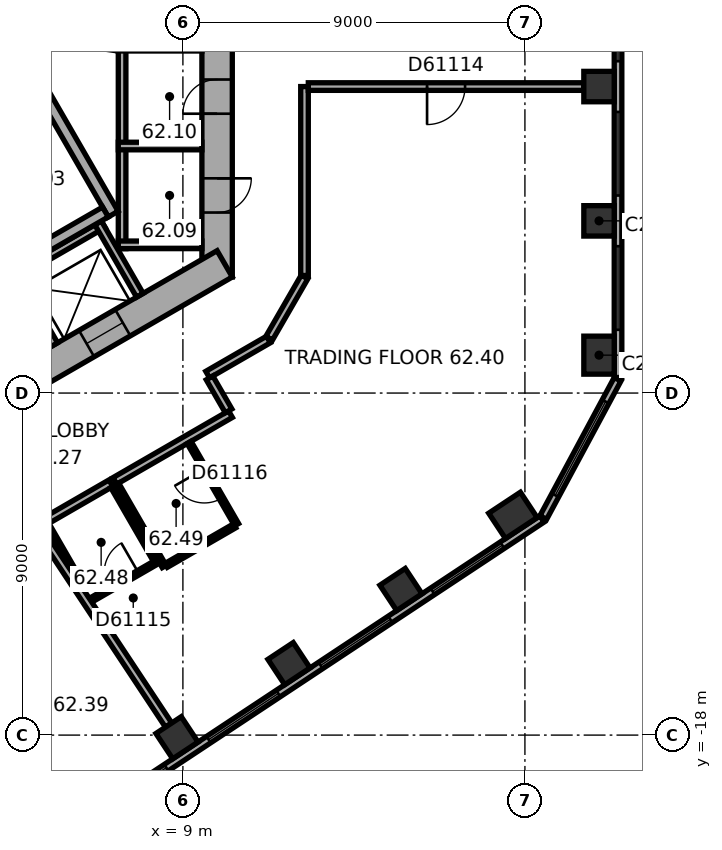
"""IFC4 building model, lengths in metres.
Left out: names, types, materials, properties, quantities, classifications, styles, units other than length and angle.
Written with IfcOpenShell. Run it as: python <this file> out.ifc"""

import sys

from ifc_helpers import new_model, si_unit, direction, frame, frame_2d, origin, origin_2d, place, context, subcontext, project, spatial, rectangle, extrude, element, fill, save


model = new_model("IFC4")
c1 = context("Model", 3, precision=1e-05, world=origin(), true_north=direction((0.0, 1.0)))
c2 = subcontext(c1, "Body", "Model", "MODEL_VIEW")
j1 = project(units=[si_unit("LENGTHUNIT", "METRE"), si_unit("PLANEANGLEUNIT", "RADIAN")], contexts=[c1])
p1 = place(None, origin())
s1 = spatial("IfcSite", under=j1, at=p1, CompositionType="ELEMENT")
p2 = place(p1, origin())
s2 = spatial("IfcBuilding", under=s1, at=p2, CompositionType="ELEMENT")
p3 = place(p2, frame((0.0, 0.0, 251.3)))
s3 = spatial("IfcBuildingStorey", under=s2, at=p3, CompositionType="ELEMENT", Elevation=251.3)
p4 = place(p3, frame((19.95, -8.003, 0.0), z_axis=(0.0, 0.0, 1.0), x_axis=(0.0, 1.0, 0.0)))
e1 = element("IfcColumn", 1, at=p4, inside=s3, PredefinedType="COLUMN", context=c2, shape_type="SweptSolid", body=[
    extrude(rectangle(XDim=1.0, YDim=0.8, at=origin_2d()), origin(), (0.0, 0.0, 1.0), 3.7),
])
for number, where, z_axis, x_axis in (
    (2, (19.95, -4.469, 0.0), (0.0, 0.0, 1.0), (0.0, 1.0, 0.0)),
    (3, (19.95, -0.936, 0.0), (0.0, 0.0, 1.0), (0.0, 1.0, 0.0)),
    (4, (8.844, -18.07, 0.0), (0.0, 0.0, 1.0), (0.834, 0.552, 0.0)),
    (5, (11.791, -16.12, 0.0), (0.0, 0.0, 1.0), (0.834, 0.552, 0.0)),
    (6, (14.738, -14.169, 0.0), (0.0, 0.0, 1.0), (0.834, 0.552, 0.0)),
):
    element("IfcColumn", number, at=place(p3, frame(where, z_axis=z_axis, x_axis=x_axis)), inside=s3, PredefinedType="COLUMN", context=c2, shape_type="SweptSolid", body=[
        extrude(rectangle(XDim=0.8, YDim=0.8, at=origin_2d()), origin(), (0.0, 0.0, 1.0), 3.7),
    ])
p5 = place(p3, frame((17.685, -12.219, 0.0), z_axis=(0.0, 0.0, 1.0), x_axis=(0.833885822067, 0.551936985312, 0.0)))
e7 = element("IfcColumn", 7, at=p5, inside=s3, PredefinedType="COLUMN", context=c2, shape_type="SweptSolid", body=[
    extrude(rectangle(XDim=1.0, YDim=0.8, at=origin_2d()), origin(), (0.0, 0.0, 1.0), 3.7),
])
p6 = place(p3, frame((9.9, -5.947, 0.0), z_axis=(0.0, 0.0, 1.0), x_axis=(0.0, 1.0, 0.0)))
e8 = element("IfcWall", 8, at=p6, inside=s3, PredefinedType="SHEAR", context=c2, shape_type="SweptSolid", body=[
    extrude(rectangle(XDim=11.894, YDim=0.8, at=frame_2d((5.947, 0.0))), origin(), (0.0, 0.0, 1.0), 3.7),
])
p7 = place(p6, frame((6.147, 0.0, 0.0)))
e9 = element("IfcOpeningElement", 9, at=p7, cuts=e8, PredefinedType="OPENING", context=c2, shape_type="SweptSolid", body=[
    extrude(rectangle(XDim=1.5, YDim=2.1, at=frame_2d((0.75, 1.05))), frame((0.0, 0.41, 0.0), z_axis=(0.0, -1.0, 0.0), x_axis=(1.0, 0.0, 0.0)), (0.0, 0.0, 1.0), 0.82),
])
p8 = place(p6, frame((1.697, 0.0, 0.0)))
e10 = element("IfcOpeningElement", 10, at=p8, cuts=e8, PredefinedType="OPENING", context=c2, shape_type="SweptSolid", body=[
    extrude(rectangle(XDim=0.9, YDim=2.1, at=frame_2d((0.45, 1.05))), frame((0.0, 0.41, 0.0), z_axis=(0.0, -1.0, 0.0), x_axis=(1.0, 0.0, 0.0)), (0.0, 0.0, 1.0), 0.82),
])
p9 = place(p6, frame((4.297, 0.0, 0.0)))
e11 = element("IfcOpeningElement", 11, at=p9, cuts=e8, PredefinedType="OPENING", context=c2, shape_type="SweptSolid", body=[
    extrude(rectangle(XDim=0.9, YDim=2.1, at=frame_2d((0.45, 1.05))), frame((0.0, 0.41, 0.0), z_axis=(0.0, -1.0, 0.0), x_axis=(1.0, 0.0, 0.0)), (0.0, 0.0, 1.0), 0.82),
])
p10 = place(p3, frame((-0.2, -11.547, 0.0), z_axis=(0.0, 0.0, 1.0), x_axis=(0.866023897231, 0.500002609418, 0.0)))
e12 = element("IfcWall", 12, at=p10, inside=s3, PredefinedType="SHEAR", context=c2, shape_type="SweptSolid", body=[
    extrude(rectangle(XDim=11.894, YDim=0.8, at=frame_2d((5.947, 0.0))), origin(), (0.0, 0.0, 1.0), 3.7),
])
p11 = place(p10, frame((2.497, 0.0, 0.0)))
e13 = element("IfcOpeningElement", 13, at=p11, cuts=e12, PredefinedType="OPENING", context=c2, shape_type="SweptSolid", body=[
    extrude(rectangle(XDim=1.1, YDim=2.1, at=frame_2d((0.55, 1.05))), frame((0.0, 0.41, 0.0), z_axis=(0.0, -1.0, 0.0), x_axis=(1.0, 0.0, 0.0)), (0.0, 0.0, 1.0), 0.82),
])
p12 = place(p10, frame((5.097, 0.0, 0.0)))
e14 = element("IfcOpeningElement", 14, at=p12, cuts=e12, PredefinedType="OPENING", context=c2, shape_type="SweptSolid", body=[
    extrude(rectangle(XDim=1.1, YDim=2.1, at=frame_2d((0.55, 1.05))), frame((0.0, 0.41, 0.0), z_axis=(0.0, -1.0, 0.0), x_axis=(1.0, 0.0, 0.0)), (0.0, 0.0, 1.0), 0.82),
])
p13 = place(p10, frame((7.697, 0.0, 0.0)))
e15 = element("IfcOpeningElement", 15, at=p13, cuts=e12, PredefinedType="OPENING", context=c2, shape_type="SweptSolid", body=[
    extrude(rectangle(XDim=1.1, YDim=2.1, at=frame_2d((0.55, 1.05))), frame((0.0, 0.41, 0.0), z_axis=(0.0, -1.0, 0.0), x_axis=(1.0, 0.0, 0.0)), (0.0, 0.0, 1.0), 0.82),
])
p14 = place(p3, frame((20.45, -8.59, 0.0), z_axis=(0.0, 0.0, 1.0), x_axis=(0.0, 1.0, 0.0)))
e16 = element("IfcWall", 16, at=p14, inside=s3, PredefinedType="STANDARD", context=c2, shape_type="SweptSolid", body=[
    extrude(rectangle(XDim=18.841, YDim=0.2, at=frame_2d((9.421, 0.0))), origin(), (0.0, 0.0, 1.0), 3.7),
])
p15 = place(p14, frame((1.254, 0.0, 0.9)))
e17 = element("IfcOpeningElement", 17, at=p15, cuts=e16, PredefinedType="OPENING", context=c2, shape_type="SweptSolid", body=[
    extrude(rectangle(XDim=2.2, YDim=2.0, at=frame_2d((1.1, 1.0))), frame((0.0, 0.11, 0.0), z_axis=(0.0, -1.0, 0.0), x_axis=(1.0, 0.0, 0.0)), (0.0, 0.0, 1.0), 0.22),
])
p16 = place(p14, frame((4.788, 0.0, 0.9)))
e18 = element("IfcOpeningElement", 18, at=p16, cuts=e16, PredefinedType="OPENING", context=c2, shape_type="SweptSolid", body=[
    extrude(rectangle(XDim=2.2, YDim=2.0, at=frame_2d((1.1, 1.0))), frame((0.0, 0.11, 0.0), z_axis=(0.0, -1.0, 0.0), x_axis=(1.0, 0.0, 0.0)), (0.0, 0.0, 1.0), 0.22),
])
p17 = place(p14, frame((8.322, 0.0, 0.9)))
e19 = element("IfcOpeningElement", 19, at=p17, cuts=e16, PredefinedType="OPENING", context=c2, shape_type="SweptSolid", body=[
    extrude(rectangle(XDim=2.2, YDim=2.0, at=frame_2d((1.1, 1.0))), frame((0.0, 0.11, 0.0), z_axis=(0.0, -1.0, 0.0), x_axis=(1.0, 0.0, 0.0)), (0.0, 0.0, 1.0), 0.22),
])
p18 = place(p14, frame((11.855, 0.0, 0.9)))
e20 = element("IfcOpeningElement", 20, at=p18, cuts=e16, PredefinedType="OPENING", context=c2, shape_type="SweptSolid", body=[
    extrude(rectangle(XDim=2.2, YDim=2.0, at=frame_2d((1.1, 1.0))), frame((0.0, 0.11, 0.0), z_axis=(0.0, -1.0, 0.0), x_axis=(1.0, 0.0, 0.0)), (0.0, 0.0, 1.0), 0.22),
])
p19 = place(p14, frame((15.389, 0.0, 0.9)))
e21 = element("IfcOpeningElement", 21, at=p19, cuts=e16, PredefinedType="OPENING", context=c2, shape_type="SweptSolid", body=[
    extrude(rectangle(XDim=2.2, YDim=2.0, at=frame_2d((1.1, 1.0))), frame((0.0, 0.11, 0.0), z_axis=(0.0, -1.0, 0.0), x_axis=(1.0, 0.0, 0.0)), (0.0, 0.0, 1.0), 0.22),
])
p20 = place(p3, frame((2.739, -22.711, 0.0), z_axis=(0.0, 0.0, 1.0), x_axis=(0.833885723098, 0.551937134838, 0.0)))
e22 = element("IfcWall", 22, at=p20, inside=s3, PredefinedType="STANDARD", context=c2, shape_type="SweptSolid", body=[
    extrude(rectangle(XDim=18.841, YDim=0.2, at=frame_2d((9.421, 0.0))), origin(), (0.0, 0.0, 1.0), 3.7),
])
p21 = place(p20, frame((1.252, 0.0, 0.9)))
e23 = element("IfcOpeningElement", 23, at=p21, cuts=e22, PredefinedType="OPENING", context=c2, shape_type="SweptSolid", body=[
    extrude(rectangle(XDim=2.2, YDim=2.0, at=frame_2d((1.1, 1.0))), frame((0.0, 0.11, 0.0), z_axis=(0.0, -1.0, 0.0), x_axis=(1.0, 0.0, 0.0)), (0.0, 0.0, 1.0), 0.22),
])
p22 = place(p20, frame((4.786, 0.0, 0.9)))
e24 = element("IfcOpeningElement", 24, at=p22, cuts=e22, PredefinedType="OPENING", context=c2, shape_type="SweptSolid", body=[
    extrude(rectangle(XDim=2.2, YDim=2.0, at=frame_2d((1.1, 1.0))), frame((0.0, 0.11, 0.0), z_axis=(0.0, -1.0, 0.0), x_axis=(1.0, 0.0, 0.0)), (0.0, 0.0, 1.0), 0.22),
])
p23 = place(p20, frame((8.32, 0.0, 0.9)))
e25 = element("IfcOpeningElement", 25, at=p23, cuts=e22, PredefinedType="OPENING", context=c2, shape_type="SweptSolid", body=[
    extrude(rectangle(XDim=2.2, YDim=2.0, at=frame_2d((1.1, 1.0))), frame((0.0, 0.11, 0.0), z_axis=(0.0, -1.0, 0.0), x_axis=(1.0, 0.0, 0.0)), (0.0, 0.0, 1.0), 0.22),
])
p24 = place(p20, frame((11.854, 0.0, 0.9)))
e26 = element("IfcOpeningElement", 26, at=p24, cuts=e22, PredefinedType="OPENING", context=c2, shape_type="SweptSolid", body=[
    extrude(rectangle(XDim=2.2, YDim=2.0, at=frame_2d((1.1, 1.0))), frame((0.0, 0.11, 0.0), z_axis=(0.0, -1.0, 0.0), x_axis=(1.0, 0.0, 0.0)), (0.0, 0.0, 1.0), 0.22),
])
p25 = place(p20, frame((15.387, 0.0, 0.9)))
e27 = element("IfcOpeningElement", 27, at=p25, cuts=e22, PredefinedType="OPENING", context=c2, shape_type="SweptSolid", body=[
    extrude(rectangle(XDim=2.2, YDim=2.0, at=frame_2d((1.1, 1.0))), frame((0.0, 0.11, 0.0), z_axis=(0.0, -1.0, 0.0), x_axis=(1.0, 0.0, 0.0)), (0.0, 0.0, 1.0), 0.22),
])
p26 = place(p3, frame((18.483, -12.276, 0.0), z_axis=(0.0, 0.0, 1.0), x_axis=(0.473267675015, 0.880918672629, 0.0)))
e28 = element("IfcWall", 28, at=p26, inside=s3, PredefinedType="STANDARD", context=c2, shape_type="SweptSolid", body=[
    extrude(rectangle(XDim=4.13, YDim=0.2, at=frame_2d((2.065, 0.0))), origin(), (0.0, 0.0, 1.0), 3.7),
])
p27 = place(p26, frame((0.665, 0.0, 0.9)))
e29 = element("IfcOpeningElement", 29, at=p27, cuts=e28, PredefinedType="OPENING", context=c2, shape_type="SweptSolid", body=[
    extrude(rectangle(XDim=2.8, YDim=2.0, at=frame_2d((1.4, 1.0))), frame((0.0, 0.11, 0.0), z_axis=(0.0, -1.0, 0.0), x_axis=(1.0, 0.0, 0.0)), (0.0, 0.0, 1.0), 0.22),
])
p28 = place(p3, frame((7.4, -5.2, 0.0), z_axis=(0.0, 0.0, 1.0), x_axis=(0.0, 1.0, 0.0)))
e30 = element("IfcWall", 30, at=p28, inside=s3, PredefinedType="PARTITIONING", context=c2, shape_type="SweptSolid", body=[
    extrude(rectangle(XDim=5.4, YDim=0.2, at=frame_2d((2.7, 0.0))), origin(), (0.0, 0.0, 1.0), 3.35),
])
for number, where, z_axis, x_axis in (
    (31, (7.3, -5.1, 0.0), (0.0, 0.0, 1.0), (1.0, 0.0, 0.0)),
    (32, (7.3, -2.5, 0.0), (0.0, 0.0, 1.0), (1.0, 0.0, 0.0)),
):
    element("IfcWall", number, at=place(p3, frame(where, z_axis=z_axis, x_axis=x_axis)), inside=s3, PredefinedType="PARTITIONING", context=c2, shape_type="SweptSolid", body=[
        extrude(rectangle(XDim=2.2, YDim=0.2, at=frame_2d((1.1, 0.0))), origin(), (0.0, 0.0, 1.0), 3.35),
    ])
p29 = place(p3, frame((-0.024, -8.559, 0.0), z_axis=(0.0, 0.0, 1.0), x_axis=(0.866026010844, 0.49999894854, 0.0)))
e33 = element("IfcWall", 33, at=p29, inside=s3, PredefinedType="PARTITIONING", context=c2, shape_type="SweptSolid", body=[
    extrude(rectangle(XDim=8.0, YDim=0.2, at=frame_2d((4.0, 0.0))), origin(), (0.0, 0.0, 1.0), 3.35),
])
for number, where, z_axis, x_axis in (
    (34, (4.516, -5.822, 0.0), (0.0, 0.0, 1.0), (0.5, -0.866, 0.0)),
    (35, (6.768, -4.522, 0.0), (0.0, 0.0, 1.0), (0.5, -0.866, 0.0)),
):
    element("IfcWall", number, at=place(p3, frame(where, z_axis=z_axis, x_axis=x_axis)), inside=s3, PredefinedType="PARTITIONING", context=c2, shape_type="SweptSolid", body=[
        extrude(rectangle(XDim=2.2, YDim=0.2, at=frame_2d((1.1, 0.0))), origin(), (0.0, 0.0, 1.0), 3.35),
    ])
p30 = place(p3, frame((4.816, -0.222, 0.0), z_axis=(0.0, 0.0, 1.0), x_axis=(0.499977259774, -0.866038532462, 0.0)))
e36 = element("IfcWall", 36, at=p30, inside=s3, PredefinedType="SHEAR", context=c2, shape_type="SweptSolid", body=[
    extrude(rectangle(XDim=4.7, YDim=0.3, at=frame_2d((2.35, 0.0))), origin(), (0.0, 0.0, 1.0), 3.35),
])
p31 = place(p3, frame((0.847, -7.767, 0.0), z_axis=(0.0, 0.0, 1.0), x_axis=(0.866027801685, 0.499995846692, 0.0)))
e37 = element("IfcWall", 37, at=p31, inside=s3, PredefinedType="SHEAR", context=c2, shape_type="SweptSolid", body=[
    extrude(rectangle(XDim=7.06, YDim=0.3, at=frame_2d((3.53, 0.0))), origin(), (0.0, 0.0, 1.0), 3.35),
])
p32 = place(p3, frame((5.373, -12.372, 0.0), z_axis=(0.0, 0.0, 1.0), x_axis=(0.866010750942, 0.50002537861, 0.0)))
e38 = element("IfcWall", 38, at=p32, inside=s3, PredefinedType="PARTITIONING", context=c2, shape_type="SweptSolid", body=[
    extrude(rectangle(XDim=2.0, YDim=0.2, at=frame_2d((1.0, 0.0))), origin(), (0.0, 0.0, 1.0), 3.35),
])
p33 = place(p3, frame((6.107, -13.644, 0.0), z_axis=(0.0, 0.0, 1.0), x_axis=(-0.500072492706, 0.865983546056, 0.0)))
e39 = element("IfcWall", 39, at=p33, inside=s3, PredefinedType="PARTITIONING", context=c2, shape_type="SweptSolid", body=[
    extrude(rectangle(XDim=1.368, YDim=0.12, at=frame_2d((0.684, 0.0))), origin(), (0.0, 0.0, 1.0), 3.35),
])
p34 = place(p3, frame((7.155, -11.459, 0.0), z_axis=(0.0, 0.0, 1.0), x_axis=(0.500077740698, -0.865980515519, 0.0)))
e40 = element("IfcWall", 40, at=p34, inside=s3, PredefinedType="PARTITIONING", context=c2, shape_type="SweptSolid", body=[
    extrude(rectangle(XDim=2.3, YDim=0.12, at=frame_2d((1.15, 0.0))), origin(), (0.0, 0.0, 1.0), 3.35),
])
p35 = place(p3, frame((7.208, -11.312, 0.0), z_axis=(0.0, 0.0, 1.0), x_axis=(0.866050243185, 0.499956974429, 0.0)))
e41 = element("IfcWall", 41, at=p35, inside=s3, PredefinedType="PARTITIONING", context=c2, shape_type="SweptSolid", body=[
    extrude(rectangle(XDim=3.514, YDim=0.2, at=frame_2d((1.757, 0.0))), origin(), (0.0, 0.0, 1.0), 3.35),
])
p36 = place(p3, frame((8.253, -13.481, 0.0), z_axis=(0.0, 0.0, 1.0), x_axis=(-0.866045024864, -0.499966013754, 0.0)))
e42 = element("IfcWall", 42, at=p36, inside=s3, PredefinedType="PARTITIONING", context=c2, shape_type="SweptSolid", body=[
    extrude(rectangle(XDim=1.88, YDim=0.12, at=frame_2d((0.94, 0.0))), origin(), (0.0, 0.0, 1.0), 3.35),
])
p37 = place(p36, frame((0.49, 0.0, 0.0)))
e43 = element("IfcOpeningElement", 43, at=p37, cuts=e42, PredefinedType="OPENING", context=c2, shape_type="SweptSolid", body=[
    extrude(rectangle(XDim=0.9, YDim=2.1, at=frame_2d((0.45, 1.05))), frame((0.0, 0.07, 0.0), z_axis=(0.0, -1.0, 0.0), x_axis=(1.0, 0.0, 0.0)), (0.0, 0.0, 1.0), 0.14),
])
p38 = place(p3, frame((8.509, -13.564, 0.0), z_axis=(0.0, 0.0, 1.0), x_axis=(-0.500004234368, 0.866022959057, 0.0)))
e44 = element("IfcWall", 44, at=p38, inside=s3, PredefinedType="PARTITIONING", context=c2, shape_type="SweptSolid", body=[
    extrude(rectangle(XDim=2.5, YDim=0.12, at=frame_2d((1.25, 0.0))), origin(), (0.0, 0.0, 1.0), 3.35),
])
p39 = place(p3, frame((8.624, -17.737, 0.0), z_axis=(0.0, 0.0, 1.0), x_axis=(-0.551945242328, 0.833880356809, 0.0)))
e45 = element("IfcWall", 45, at=p39, inside=s3, PredefinedType="PARTITIONING", context=c2, shape_type="SweptSolid", body=[
    extrude(rectangle(XDim=6.183, YDim=0.2, at=frame_2d((3.091, 0.0))), origin(), (0.0, 0.0, 1.0), 2.65),
])
p40 = place(p3, frame((9.164, -10.299, 0.0), z_axis=(0.0, 0.0, 1.0), x_axis=(0.500004234368, -0.866022959057, 0.0)))
e46 = element("IfcWall", 46, at=p40, inside=s3, PredefinedType="PARTITIONING", context=c2, shape_type="SweptSolid", body=[
    extrude(rectangle(XDim=2.5, YDim=0.12, at=frame_2d((1.25, 0.0))), origin(), (0.0, 0.0, 1.0), 3.35),
])
p41 = place(p40, frame((0.8, 0.0, 0.0)))
e47 = element("IfcOpeningElement", 47, at=p41, cuts=e46, PredefinedType="OPENING", context=c2, shape_type="SweptSolid", body=[
    extrude(rectangle(XDim=0.9, YDim=2.1, at=frame_2d((0.45, 1.05))), frame((0.0, 0.07, 0.0), z_axis=(0.0, -1.0, 0.0), x_axis=(1.0, 0.0, 0.0)), (0.0, 0.0, 1.0), 0.14),
])
p42 = place(p3, frame((9.652, -8.515, 0.0), z_axis=(0.0, 0.0, 1.0), x_axis=(0.866020375458, 0.500008709215, 0.0)))
e48 = element("IfcWall", 48, at=p42, inside=s3, PredefinedType="PARTITIONING", context=c2, shape_type="SweptSolid", body=[
    extrude(rectangle(XDim=1.846, YDim=0.2, at=frame_2d((0.923, 0.0))), origin(), (0.0, 0.0, 1.0), 3.35),
])
p43 = place(p3, frame((10.202, -9.469, 0.0), z_axis=(0.0, 0.0, 1.0), x_axis=(-0.499968756647, 0.866043441391, 0.0)))
e49 = element("IfcWall", 49, at=p43, inside=s3, PredefinedType="PARTITIONING", context=c2, shape_type="SweptSolid", body=[
    extrude(rectangle(XDim=1.001, YDim=0.2, at=frame_2d((0.5, 0.0))), origin(), (0.0, 0.0, 1.0), 3.35),
])
p44 = place(p3, frame((10.362, -12.494, 0.0), z_axis=(0.0, 0.0, 1.0), x_axis=(-0.866009661879, -0.500027264788, 0.0)))
e50 = element("IfcWall", 50, at=p44, inside=s3, PredefinedType="PARTITIONING", context=c2, shape_type="SweptSolid", body=[
    extrude(rectangle(XDim=2.08, YDim=0.12, at=frame_2d((1.04, 0.0))), origin(), (0.0, 0.0, 1.0), 3.35),
])
p45 = place(p3, frame((11.27, -7.558, 0.0), z_axis=(0.0, 0.0, 1.0), x_axis=(0.499964847546, 0.866045698112, 0.0)))
e51 = element("IfcWall", 51, at=p45, inside=s3, PredefinedType="PARTITIONING", context=c2, shape_type="SweptSolid", body=[
    extrude(rectangle(XDim=1.86, YDim=0.2, at=frame_2d((0.93, 0.0))), origin(), (0.0, 0.0, 1.0), 3.35),
])
p46 = place(p3, frame((12.2, -5.907, 0.0), z_axis=(0.0, 0.0, 1.0), x_axis=(0.0, 1.0, 0.0)))
e52 = element("IfcWall", 52, at=p46, inside=s3, PredefinedType="PARTITIONING", context=c2, shape_type="SweptSolid", body=[
    extrude(rectangle(XDim=4.971, YDim=0.2, at=frame_2d((2.486, 0.0))), origin(), (0.0, 0.0, 1.0), 3.35),
])
p47 = place(p3, frame((12.3, -0.936, 0.0), z_axis=(0.0, 0.0, 1.0), x_axis=(1.0, 0.0, 0.0)))
e53 = element("IfcWall", 53, at=p47, inside=s3, PredefinedType="PARTITIONING", context=c2, shape_type="SweptSolid", body=[
    extrude(rectangle(XDim=7.25, YDim=0.2, at=frame_2d((3.625, 0.0))), origin(), (0.0, 0.0, 1.0), 2.65),
])
p48 = place(p47, frame((3.125, 0.0, 0.0)))
e54 = element("IfcOpeningElement", 54, at=p48, cuts=e53, PredefinedType="OPENING", context=c2, shape_type="SweptSolid", body=[
    extrude(rectangle(XDim=1.0, YDim=2.1, at=frame_2d((0.5, 1.05))), frame((0.0, 0.11, 0.0), z_axis=(0.0, -1.0, 0.0), x_axis=(1.0, 0.0, 0.0)), (0.0, 0.0, 1.0), 0.22),
])
p49 = place(p15, origin())
e55 = element("IfcWindow", 55, at=p49, inside=s3, PartitioningType="SINGLE_PANEL", PredefinedType="WINDOW", context=c2, shape_type="SweptSolid", body=[
    extrude(rectangle(XDim=2.2, YDim=2.0, at=frame_2d((1.1, 1.0))), frame((0.0, 0.03, 0.0), z_axis=(0.0, -1.0, 0.0), x_axis=(1.0, 0.0, 0.0)), (0.0, 0.0, 1.0), 0.06),
])
fill(e17, e55)
p50 = place(p16, origin())
e56 = element("IfcWindow", 56, at=p50, inside=s3, PartitioningType="SINGLE_PANEL", PredefinedType="WINDOW", context=c2, shape_type="SweptSolid", body=[
    extrude(rectangle(XDim=2.2, YDim=2.0, at=frame_2d((1.1, 1.0))), frame((0.0, 0.03, 0.0), z_axis=(0.0, -1.0, 0.0), x_axis=(1.0, 0.0, 0.0)), (0.0, 0.0, 1.0), 0.06),
])
fill(e18, e56)
p51 = place(p17, origin())
e57 = element("IfcWindow", 57, at=p51, inside=s3, PartitioningType="SINGLE_PANEL", PredefinedType="WINDOW", context=c2, shape_type="SweptSolid", body=[
    extrude(rectangle(XDim=2.2, YDim=2.0, at=frame_2d((1.1, 1.0))), frame((0.0, 0.03, 0.0), z_axis=(0.0, -1.0, 0.0), x_axis=(1.0, 0.0, 0.0)), (0.0, 0.0, 1.0), 0.06),
])
fill(e19, e57)
p52 = place(p22, origin())
e58 = element("IfcWindow", 58, at=p52, inside=s3, PartitioningType="SINGLE_PANEL", PredefinedType="WINDOW", context=c2, shape_type="SweptSolid", body=[
    extrude(rectangle(XDim=2.2, YDim=2.0, at=frame_2d((1.1, 1.0))), frame((0.0, 0.03, 0.0), z_axis=(0.0, -1.0, 0.0), x_axis=(1.0, 0.0, 0.0)), (0.0, 0.0, 1.0), 0.06),
])
fill(e24, e58)
p53 = place(p23, origin())
e59 = element("IfcWindow", 59, at=p53, inside=s3, PartitioningType="SINGLE_PANEL", PredefinedType="WINDOW", context=c2, shape_type="SweptSolid", body=[
    extrude(rectangle(XDim=2.2, YDim=2.0, at=frame_2d((1.1, 1.0))), frame((0.0, 0.03, 0.0), z_axis=(0.0, -1.0, 0.0), x_axis=(1.0, 0.0, 0.0)), (0.0, 0.0, 1.0), 0.06),
])
fill(e25, e59)
p54 = place(p24, origin())
e60 = element("IfcWindow", 60, at=p54, inside=s3, PartitioningType="SINGLE_PANEL", PredefinedType="WINDOW", context=c2, shape_type="SweptSolid", body=[
    extrude(rectangle(XDim=2.2, YDim=2.0, at=frame_2d((1.1, 1.0))), frame((0.0, 0.03, 0.0), z_axis=(0.0, -1.0, 0.0), x_axis=(1.0, 0.0, 0.0)), (0.0, 0.0, 1.0), 0.06),
])
fill(e26, e60)
p55 = place(p25, origin())
e61 = element("IfcWindow", 61, at=p55, inside=s3, PartitioningType="SINGLE_PANEL", PredefinedType="WINDOW", context=c2, shape_type="SweptSolid", body=[
    extrude(rectangle(XDim=2.2, YDim=2.0, at=frame_2d((1.1, 1.0))), frame((0.0, 0.03, 0.0), z_axis=(0.0, -1.0, 0.0), x_axis=(1.0, 0.0, 0.0)), (0.0, 0.0, 1.0), 0.06),
])
fill(e27, e61)
p56 = place(p27, origin())
e62 = element("IfcWindow", 62, at=p56, inside=s3, PartitioningType="SINGLE_PANEL", PredefinedType="WINDOW", context=c2, shape_type="SweptSolid", body=[
    extrude(rectangle(XDim=2.8, YDim=2.0, at=frame_2d((1.4, 1.0))), frame((0.0, 0.03, 0.0), z_axis=(0.0, -1.0, 0.0), x_axis=(1.0, 0.0, 0.0)), (0.0, 0.0, 1.0), 0.06),
])
fill(e29, e62)
p57 = place(p8, origin())
e63 = element("IfcDoor", 63, at=p57, inside=s3, OperationType="SINGLE_SWING_LEFT", PredefinedType="DOOR", context=c2, shape_type="SweptSolid", body=[
    extrude(rectangle(XDim=0.9, YDim=2.1, at=frame_2d((0.45, 1.05))), frame((0.0, 0.025, 0.0), z_axis=(0.0, -1.0, 0.0), x_axis=(1.0, 0.0, 0.0)), (0.0, 0.0, 1.0), 0.05),
])
fill(e10, e63)
p58 = place(p9, origin())
e64 = element("IfcDoor", 64, at=p58, inside=s3, OperationType="SINGLE_SWING_LEFT", PredefinedType="DOOR", context=c2, shape_type="SweptSolid", body=[
    extrude(rectangle(XDim=0.9, YDim=2.1, at=frame_2d((0.45, 1.05))), frame((0.0, 0.025, 0.0), z_axis=(0.0, -1.0, 0.0), x_axis=(1.0, 0.0, 0.0)), (0.0, 0.0, 1.0), 0.05),
])
fill(e11, e64)
p59 = place(p13, origin())
e65 = element("IfcDoor", 65, at=p59, inside=s3, OperationType="DOUBLE_DOOR_SLIDING", PredefinedType="DOOR", context=c2, shape_type="SweptSolid", body=[
    extrude(rectangle(XDim=1.1, YDim=2.1, at=frame_2d((0.55, 1.05))), frame((0.0, 0.025, 0.0), z_axis=(0.0, -1.0, 0.0), x_axis=(1.0, 0.0, 0.0)), (0.0, 0.0, 1.0), 0.05),
])
fill(e15, e65)
p60 = place(p48, origin())
e66 = element("IfcDoor", 66, at=p60, inside=s3, OperationType="SINGLE_SWING_LEFT", PredefinedType="DOOR", context=c2, shape_type="SweptSolid", body=[
    extrude(rectangle(XDim=1.0, YDim=2.1, at=frame_2d((0.5, 1.05))), frame((0.0, 0.025, 0.0), z_axis=(0.0, -1.0, 0.0), x_axis=(1.0, 0.0, 0.0)), (0.0, 0.0, 1.0), 0.05),
])
fill(e54, e66)
p61 = place(p37, origin())
e67 = element("IfcDoor", 67, at=p61, inside=s3, OperationType="SINGLE_SWING_LEFT", PredefinedType="DOOR", context=c2, shape_type="SweptSolid", body=[
    extrude(rectangle(XDim=0.9, YDim=2.1, at=frame_2d((0.45, 1.05))), frame((0.0, 0.025, 0.0), z_axis=(0.0, -1.0, 0.0), x_axis=(1.0, 0.0, 0.0)), (0.0, 0.0, 1.0), 0.05),
])
fill(e43, e67)
p62 = place(p41, origin())
e68 = element("IfcDoor", 68, at=p62, inside=s3, OperationType="SINGLE_SWING_LEFT", PredefinedType="DOOR", context=c2, shape_type="SweptSolid", body=[
    extrude(rectangle(XDim=0.9, YDim=2.1, at=frame_2d((0.45, 1.05))), frame((0.0, 0.025, 0.0), z_axis=(0.0, -1.0, 0.0), x_axis=(1.0, 0.0, 0.0)), (0.0, 0.0, 1.0), 0.05),
])
fill(e47, e68)
save(model, sys.argv[1])
